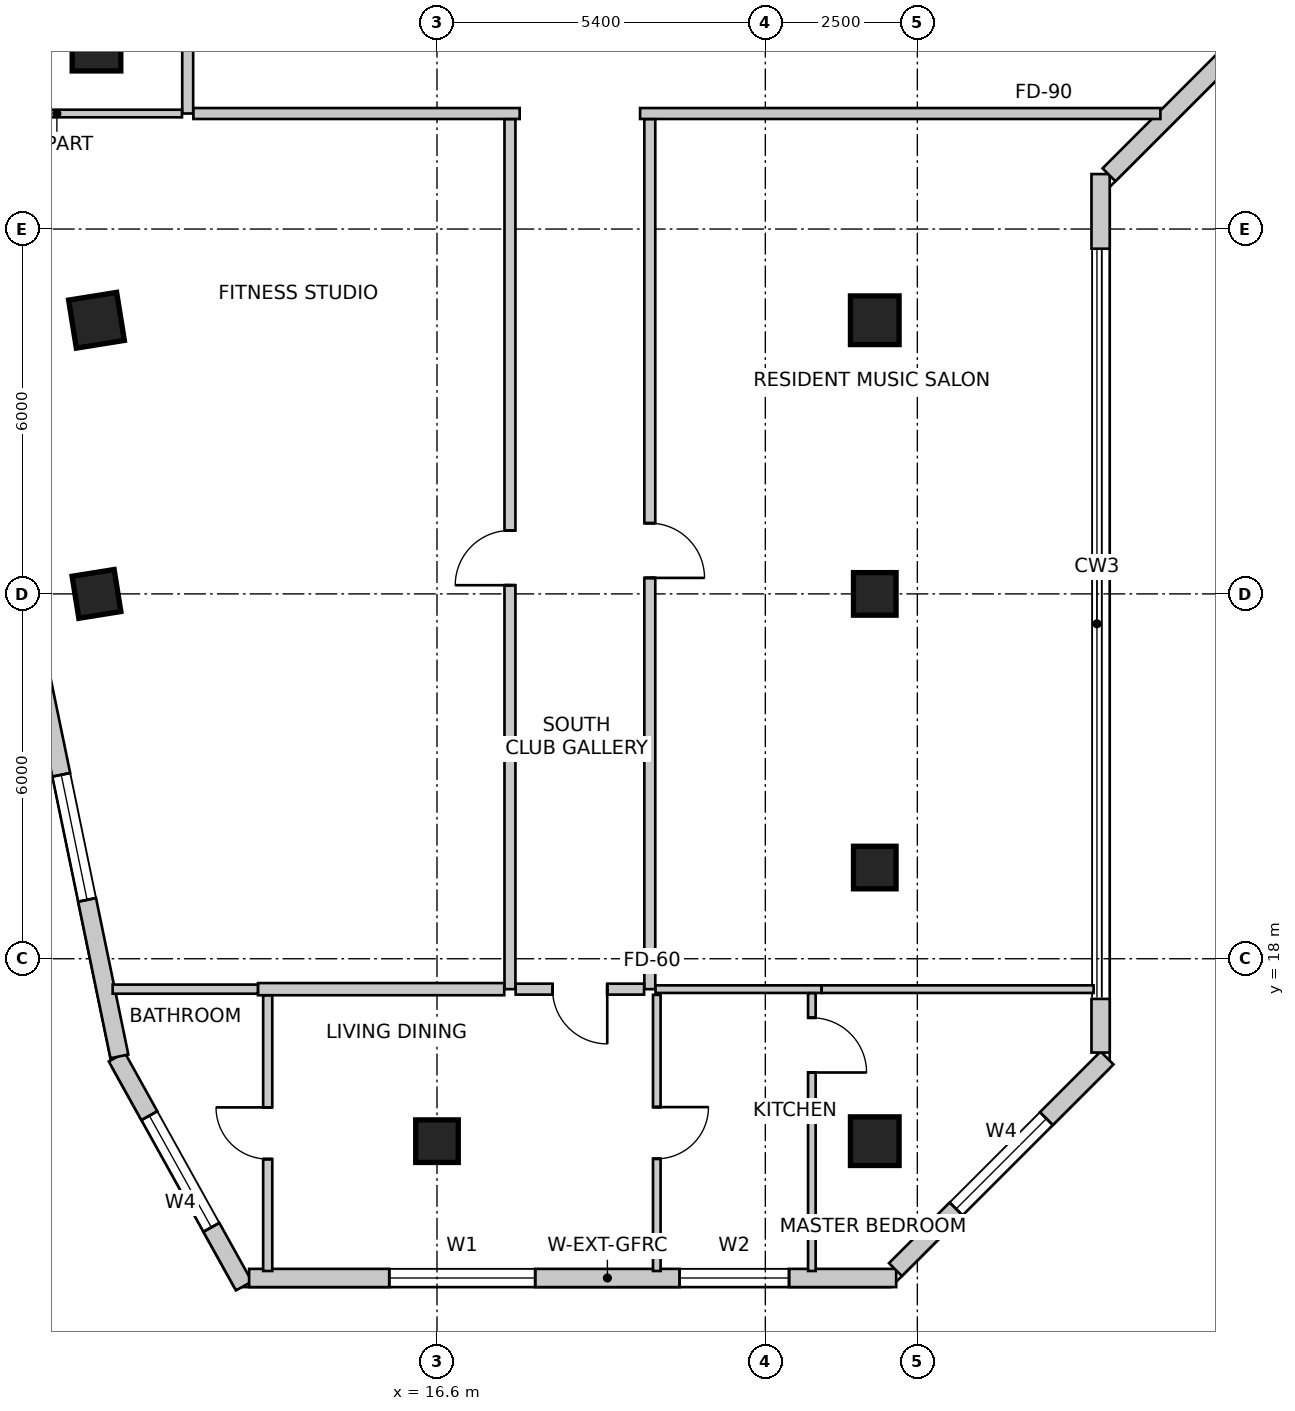
"""IFC4 building model, lengths in metres.
Left out: names, types, materials, properties, quantities, classifications, styles, units other than length and angle.
Written with IfcOpenShell. Run it as: python <this file> out.ifc"""

import sys

from ifc_helpers import new_model, si_unit, direction, frame, frame_2d, origin, origin_2d, place, context, subcontext, project, spatial, rectangle, extrude, source, transform, mapped, element, fill, save


model = new_model("IFC4")
c1 = context("Model", 3, precision=1e-05, world=origin(), true_north=direction((0.0, 1.0)))
c2 = subcontext(c1, "Body", "Model", "MODEL_VIEW")
j1 = project(units=[si_unit("LENGTHUNIT", "METRE"), si_unit("PLANEANGLEUNIT", "RADIAN")], contexts=[c1])
p1 = place(None, origin())
s1 = spatial("IfcSite", under=j1, at=p1, CompositionType="ELEMENT")
p2 = place(p1, origin())
s2 = spatial("IfcBuilding", under=s1, at=p2, CompositionType="ELEMENT")
p3 = place(p2, frame((0.0, 0.0, 228.9)))
s3 = spatial("IfcBuildingStorey", under=s2, at=p3, CompositionType="ELEMENT", Elevation=228.9)
m1 = source(origin(), c2, "Body", "SweptSolid", [
    extrude(rectangle(XDim=0.8, YDim=0.8, at=origin_2d()), origin(), (0.0, 0.0, 1.0), 3.5),
])
for number, where, z_axis, x_axis in (
    (1, (11.0, 33.0, 0.0), (0.0, 0.0, 1.0), (1.0, 0.0, 0.0)),
    (2, (11.0, 28.5, 0.0), (0.0, 0.0, 1.0), (0.158, -0.987, 0.0)),
):
    element("IfcColumn", number, at=place(p3, frame(where, z_axis=z_axis, x_axis=x_axis)), inside=s3, PredefinedType="COLUMN", context=c2, shape_type="MappedRepresentation", body=[
        mapped(m1, transform((0.0, 0.0, 0.0), scale=1.0)),
    ])
m2 = source(origin(), c2, "Body", "SweptSolid", [
    extrude(rectangle(XDim=0.7, YDim=0.7, at=origin_2d()), origin(), (0.0, 0.0, 1.0), 3.5),
])
p4 = place(p3, frame((11.0, 24.0, 0.0), z_axis=(0.0, 0.0, 1.0), x_axis=(0.158158067254, -0.987413806751, 0.0)))
e3 = element("IfcColumn", 3, at=p4, inside=s3, PredefinedType="COLUMN", context=c2, shape_type="MappedRepresentation", body=[
    mapped(m2, transform((0.0, 0.0, 0.0), scale=1.0)),
])
p5 = place(p3, frame((23.8, 28.5, 0.0), z_axis=(0.0, 0.0, 1.0), x_axis=(1.0, 0.0, 0.0)))
e4 = element("IfcColumn", 4, at=p5, inside=s3, PredefinedType="COLUMN", context=c2, shape_type="MappedRepresentation", body=[
    mapped(m1, transform((0.0, 0.0, 0.0), scale=1.0)),
])
for number, where, z_axis, x_axis in (
    (5, (23.8, 24.0, 0.0), (0.0, 0.0, 1.0), (1.0, 0.0, 0.0)),
    (6, (23.8, 19.5, 0.0), (0.0, 0.0, 1.0), (1.0, 0.0, 0.0)),
):
    element("IfcColumn", number, at=place(p3, frame(where, z_axis=z_axis, x_axis=x_axis)), inside=s3, PredefinedType="COLUMN", context=c2, shape_type="MappedRepresentation", body=[
        mapped(m2, transform((0.0, 0.0, 0.0), scale=1.0)),
    ])
p6 = place(p3, frame((23.8, 15.0, 0.0), z_axis=(0.0, 0.0, 1.0), x_axis=(1.0, 0.0, 0.0)))
e7 = element("IfcColumn", 7, at=p6, inside=s3, PredefinedType="COLUMN", context=c2, shape_type="MappedRepresentation", body=[
    mapped(m1, transform((0.0, 0.0, 0.0), scale=1.0)),
])
p7 = place(p3, frame((16.6, 15.0, 0.0), z_axis=(0.0, 0.0, 1.0), x_axis=(1.0, 0.0, 0.0)))
e8 = element("IfcColumn", 8, at=p7, inside=s3, PredefinedType="COLUMN", context=c2, shape_type="MappedRepresentation", body=[
    mapped(m2, transform((0.0, 0.0, 0.0), scale=1.0)),
])
p8 = place(p3, frame((11.333, 16.384, 0.0), z_axis=(0.0, 0.0, 1.0), x_axis=(0.485633305139, -0.874162623852, 0.0)))
e9 = element("IfcWall", 9, at=p8, inside=s3, PredefinedType="SOLIDWALL", context=c2, shape_type="SweptSolid", body=[
    extrude(rectangle(XDim=4.307, YDim=0.3, at=frame_2d((2.153, 0.0))), origin(), (0.0, 0.0, 1.0), 3.25),
])
m3 = source(origin(), c2, "Body", "SweptSolid", [
    extrude(rectangle(XDim=2.1, YDim=2.0, at=frame_2d((1.05, 1.0))), frame((0.0, 0.16, 0.0), z_axis=(0.0, -1.0, 0.0), x_axis=(1.0, 0.0, 0.0)), (0.0, 0.0, 1.0), 0.32),
])
p9 = place(p8, frame((1.104, 0.0, 0.85)))
e10 = element("IfcOpeningElement", 10, at=p9, cuts=e9, PredefinedType="OPENING", context=c2, shape_type="MappedRepresentation", body=[
    mapped(m3, transform((0.0, 0.0, 0.0), scale=1.0)),
])
p10 = place(p3, frame((13.51, 12.75, 0.0), z_axis=(0.0, 0.0, 1.0), x_axis=(1.0, 0.0, 0.0)))
e11 = element("IfcWall", 11, at=p10, inside=s3, PredefinedType="SOLIDWALL", context=c2, shape_type="SweptSolid", body=[
    extrude(rectangle(XDim=10.642, YDim=0.3, at=frame_2d((5.321, 0.0))), origin(), (0.0, 0.0, 1.0), 3.25),
])
m4 = source(origin(), c2, "Body", "SweptSolid", [
    extrude(rectangle(XDim=2.4, YDim=2.2, at=frame_2d((1.2, 1.1))), frame((0.0, 0.16, 0.0), z_axis=(0.0, -1.0, 0.0), x_axis=(1.0, 0.0, 0.0)), (0.0, 0.0, 1.0), 0.32),
])
p11 = place(p10, frame((2.305, 0.0, 0.85)))
e12 = element("IfcOpeningElement", 12, at=p11, cuts=e11, PredefinedType="OPENING", context=c2, shape_type="MappedRepresentation", body=[
    mapped(m4, transform((0.0, 0.0, 0.0), scale=1.0)),
])
m5 = source(origin(), c2, "Body", "SweptSolid", [
    extrude(rectangle(XDim=1.8, YDim=2.1, at=frame_2d((0.9, 1.05))), frame((0.0, 0.16, 0.0), z_axis=(0.0, -1.0, 0.0), x_axis=(1.0, 0.0, 0.0)), (0.0, 0.0, 1.0), 0.32),
])
p12 = place(p10, frame((7.08, 0.0, 0.85)))
e13 = element("IfcOpeningElement", 13, at=p12, cuts=e11, PredefinedType="OPENING", context=c2, shape_type="MappedRepresentation", body=[
    mapped(m5, transform((0.0, 0.0, 0.0), scale=1.0)),
])
p13 = place(p3, frame((24.14, 12.888, 0.0), z_axis=(0.0, 0.0, 1.0), x_axis=(0.707106781187, 0.707106781187, 0.0)))
e14 = element("IfcWall", 14, at=p13, inside=s3, PredefinedType="SOLIDWALL", context=c2, shape_type="SweptSolid", body=[
    extrude(rectangle(XDim=4.922, YDim=0.3, at=frame_2d((2.461, 0.0))), origin(), (0.0, 0.0, 1.0), 3.25),
])
p14 = place(p13, frame((1.411, 0.0, 0.85)))
e15 = element("IfcOpeningElement", 15, at=p14, cuts=e14, PredefinedType="OPENING", context=c2, shape_type="MappedRepresentation", body=[
    mapped(m3, transform((0.0, 0.0, 0.0), scale=1.0)),
])
p15 = place(p3, frame((27.514, 16.457, 0.0), z_axis=(0.0, 0.0, 1.0), x_axis=(0.0, 1.0, 0.0)))
e16 = element("IfcWall", 16, at=p15, inside=s3, PredefinedType="SOLIDWALL", context=c2, shape_type="SweptSolid", body=[
    extrude(rectangle(XDim=0.882, YDim=0.3, at=frame_2d((0.441, 0.0))), origin(), (0.0, 0.0, 1.0), 3.25),
])
p16 = place(p3, frame((27.514, 29.677, 0.0), z_axis=(0.0, 0.0, 1.0), x_axis=(0.0, 1.0, 0.0)))
e17 = element("IfcWall", 17, at=p16, inside=s3, PredefinedType="SOLIDWALL", context=c2, shape_type="SweptSolid", body=[
    extrude(rectangle(XDim=1.228, YDim=0.3, at=frame_2d((0.614, 0.0))), origin(), (0.0, 0.0, 1.0), 3.25),
])
p17 = place(p3, frame((27.652, 30.892, 0.0), z_axis=(0.0, 0.0, 1.0), x_axis=(0.707106781187, 0.707106781187, 0.0)))
e18 = element("IfcWall", 18, at=p17, inside=s3, PredefinedType="SOLIDWALL", context=c2, shape_type="SweptSolid", body=[
    extrude(rectangle(XDim=2.907, YDim=0.3, at=frame_2d((1.454, 0.0))), origin(), (0.0, 0.0, 1.0), 3.25),
])
p18 = place(p3, frame((13.269, 47.134, 0.0), z_axis=(0.0, 0.0, 1.0), x_axis=(-0.319920776449, -0.947444297464, 0.0)))
e19 = element("IfcWall", 19, at=p18, inside=s3, PredefinedType="SOLIDWALL", context=c2, shape_type="SweptSolid", body=[
    extrude(rectangle(XDim=16.133, YDim=0.3, at=frame_2d((8.067, 0.0))), origin(), (0.0, 0.0, 1.0), 3.25),
])
p19 = place(p18, frame((2.363, 0.0, 0.85)))
e20 = element("IfcOpeningElement", 20, at=p19, cuts=e19, PredefinedType="OPENING", context=c2, shape_type="MappedRepresentation", body=[
    mapped(m4, transform((0.0, 0.0, 0.0), scale=1.0)),
])
p20 = place(p18, frame((7.41, 0.0, 0.85)))
e21 = element("IfcOpeningElement", 21, at=p20, cuts=e19, PredefinedType="OPENING", context=c2, shape_type="MappedRepresentation", body=[
    mapped(m3, transform((0.0, 0.0, 0.0), scale=1.0)),
])
p21 = place(p18, frame((12.157, 0.0, 0.85)))
e22 = element("IfcOpeningElement", 22, at=p21, cuts=e19, PredefinedType="OPENING", context=c2, shape_type="MappedRepresentation", body=[
    mapped(m4, transform((0.0, 0.0, 0.0), scale=1.0)),
])
p22 = place(p3, frame((8.188, 31.834, 0.0), z_axis=(0.0, 0.0, 1.0), x_axis=(0.202303475707, -0.979322880217, 0.0)))
e23 = element("IfcWall", 23, at=p22, inside=s3, PredefinedType="SOLIDWALL", context=c2, shape_type="SweptSolid", body=[
    extrude(rectangle(XDim=15.766, YDim=0.3, at=frame_2d((7.883, 0.0))), origin(), (0.0, 0.0, 1.0), 3.25),
])
p23 = place(p22, frame((1.623, 0.0, 0.85)))
e24 = element("IfcOpeningElement", 24, at=p23, cuts=e23, PredefinedType="OPENING", context=c2, shape_type="MappedRepresentation", body=[
    mapped(m3, transform((0.0, 0.0, 0.0), scale=1.0)),
])
p24 = place(p22, frame((6.18, 0.0, 0.85)))
e25 = element("IfcOpeningElement", 25, at=p24, cuts=e23, PredefinedType="OPENING", context=c2, shape_type="MappedRepresentation", body=[
    mapped(m4, transform((0.0, 0.0, 0.0), scale=1.0)),
])
p25 = place(p22, frame((11.037, 0.0, 0.85)))
e26 = element("IfcOpeningElement", 26, at=p25, cuts=e23, PredefinedType="OPENING", context=c2, shape_type="MappedRepresentation", body=[
    mapped(m3, transform((0.0, 0.0, 0.0), scale=1.0)),
])
p26 = place(p3, frame((12.5, 31.9, 0.0), z_axis=(0.0, 0.0, 1.0), x_axis=(0.0, 1.0, 0.0)))
e27 = element("IfcWall", 27, at=p26, inside=s3, PredefinedType="PARTITIONING", context=c2, shape_type="SweptSolid", body=[
    extrude(rectangle(XDim=1.556, YDim=0.18, at=frame_2d((0.778, 0.0))), origin(), (0.0, 0.0, 1.0), 2.919),
])
p27 = place(p3, frame((17.96, 31.9, 0.0), z_axis=(0.0, 0.0, 1.0), x_axis=(-1.0, 0.0, 0.0)))
e28 = element("IfcWall", 28, at=p27, inside=s3, PredefinedType="PARTITIONING", context=c2, shape_type="SweptSolid", body=[
    extrude(rectangle(XDim=5.366, YDim=0.18, at=frame_2d((2.683, 0.0))), origin(), (0.0, 0.0, 1.0), 2.919),
])
p28 = place(p3, frame((28.497, 31.9, 0.0), z_axis=(0.0, 0.0, 1.0), x_axis=(-1.0, 0.0, 0.0)))
e29 = element("IfcWall", 29, at=p28, inside=s3, PredefinedType="PARTITIONING", context=c2, shape_type="SweptSolid", body=[
    extrude(rectangle(XDim=8.557, YDim=0.18, at=frame_2d((4.279, 0.0))), origin(), (0.0, 0.0, 1.0), 2.919),
])
p29 = place(p3, frame((12.406, 31.9, 0.0), z_axis=(0.0, 0.0, 1.0), x_axis=(-1.0, 0.0, 0.0)))
e30 = element("IfcWall", 30, at=p29, inside=s3, PredefinedType="PARTITIONING", context=c2, shape_type="SweptSolid", body=[
    extrude(rectangle(XDim=4.115, YDim=0.125, at=frame_2d((2.057, 0.0))), origin(), (0.0, 0.0, 1.0), 2.542),
])
p30 = place(p3, frame((17.8, 17.5, 0.0), z_axis=(0.0, 0.0, 1.0), x_axis=(0.0, 1.0, 0.0)))
e31 = element("IfcWall", 31, at=p30, inside=s3, PredefinedType="PARTITIONING", context=c2, shape_type="SweptSolid", body=[
    extrude(rectangle(XDim=14.306, YDim=0.18, at=frame_2d((7.153, 0.0))), origin(), (0.0, 0.0, 1.0), 2.766),
])
m6 = source(origin(), c2, "Body", "SweptSolid", [
    extrude(rectangle(XDim=0.9, YDim=2.15, at=frame_2d((0.45, 1.075))), frame((0.0, 0.1, 0.0), z_axis=(0.0, -1.0, 0.0), x_axis=(1.0, 0.0, 0.0)), (0.0, 0.0, 1.0), 0.2),
])
p31 = place(p30, frame((6.643, 0.0, 0.0)))
e32 = element("IfcOpeningElement", 32, at=p31, cuts=e31, PredefinedType="OPENING", context=c2, shape_type="MappedRepresentation", body=[
    mapped(m6, transform((0.0, 0.0, 0.0), scale=1.0)),
])
p32 = place(p3, frame((20.1, 31.806, 0.0), z_axis=(0.0, 0.0, 1.0), x_axis=(0.0, -1.0, 0.0)))
e33 = element("IfcWall", 33, at=p32, inside=s3, PredefinedType="PARTITIONING", context=c2, shape_type="SweptSolid", body=[
    extrude(rectangle(XDim=14.306, YDim=0.18, at=frame_2d((7.153, 0.0))), origin(), (0.0, 0.0, 1.0), 2.766),
])
p33 = place(p32, frame((6.643, 0.0, 0.0)))
e34 = element("IfcOpeningElement", 34, at=p33, cuts=e33, PredefinedType="OPENING", context=c2, shape_type="MappedRepresentation", body=[
    mapped(m6, transform((0.0, 0.0, 0.0), scale=1.0)),
])
p34 = place(p3, frame((20.006, 17.5, 0.0), z_axis=(0.0, 0.0, 1.0), x_axis=(-1.0, 0.0, 0.0)))
e35 = element("IfcWall", 35, at=p34, inside=s3, PredefinedType="PARTITIONING", context=c2, shape_type="SweptSolid", body=[
    extrude(rectangle(XDim=2.112, YDim=0.18, at=frame_2d((1.056, 0.0))), origin(), (0.0, 0.0, 1.0), 3.25),
])
p35 = place(p34, frame((0.606, 0.0, 0.0)))
e36 = element("IfcOpeningElement", 36, at=p35, cuts=e35, PredefinedType="OPENING", context=c2, shape_type="MappedRepresentation", body=[
    mapped(m6, transform((0.0, 0.0, 0.0), scale=1.0)),
])
p36 = place(p3, frame((17.706, 17.5, 0.0), z_axis=(0.0, 0.0, 1.0), x_axis=(-1.0, 0.0, 0.0)))
e37 = element("IfcWall", 37, at=p36, inside=s3, PredefinedType="PARTITIONING", context=c2, shape_type="SweptSolid", body=[
    extrude(rectangle(XDim=4.05, YDim=0.2, at=frame_2d((2.025, 0.0))), origin(), (0.0, 0.0, 1.0), 3.25),
])
p37 = place(p3, frame((13.654, 17.5, 0.0), z_axis=(0.0, 0.0, 1.0), x_axis=(-1.0, 0.0, 0.0)))
e38 = element("IfcWall", 38, at=p37, inside=s3, PredefinedType="PARTITIONING", context=c2, shape_type="SweptSolid", body=[
    extrude(rectangle(XDim=2.388, YDim=0.15, at=frame_2d((1.194, 0.0))), origin(), (0.0, 0.0, 1.0), 3.25),
])
p38 = place(p3, frame((22.925, 17.5, 0.0), z_axis=(0.0, 0.0, 1.0), x_axis=(-1.0, 0.0, 0.0)))
e39 = element("IfcWall", 39, at=p38, inside=s3, PredefinedType="PARTITIONING", context=c2, shape_type="SweptSolid", body=[
    extrude(rectangle(XDim=2.731, YDim=0.125, at=frame_2d((1.365, 0.0))), origin(), (0.0, 0.0, 1.0), 2.779),
])
p39 = place(p3, frame((27.399, 17.5, 0.0), z_axis=(0.0, 0.0, 1.0), x_axis=(-1.0, 0.0, 0.0)))
e40 = element("IfcWall", 40, at=p39, inside=s3, PredefinedType="PARTITIONING", context=c2, shape_type="SweptSolid", body=[
    extrude(rectangle(XDim=4.472, YDim=0.125, at=frame_2d((2.236, 0.0))), origin(), (0.0, 0.0, 1.0), 2.542),
])
p40 = place(p3, frame((13.816, 12.865, 0.0), z_axis=(0.0, 0.0, 1.0), x_axis=(0.0, 1.0, 0.0)))
e41 = element("IfcWall", 41, at=p40, inside=s3, PredefinedType="PARTITIONING", context=c2, shape_type="SweptSolid", body=[
    extrude(rectangle(XDim=4.531, YDim=0.15, at=frame_2d((2.266, 0.0))), origin(), (0.0, 0.0, 1.0), 3.25),
])
m7 = source(origin(), c2, "Body", "SweptSolid", [
    extrude(rectangle(XDim=0.85, YDim=2.15, at=frame_2d((0.425, 1.075))), frame((0.0, 0.085, 0.0), z_axis=(0.0, -1.0, 0.0), x_axis=(1.0, 0.0, 0.0)), (0.0, 0.0, 1.0), 0.17),
])
p41 = place(p40, frame((1.841, 0.0, 0.0)))
e42 = element("IfcOpeningElement", 42, at=p41, cuts=e41, PredefinedType="OPENING", context=c2, shape_type="MappedRepresentation", body=[
    mapped(m7, transform((0.0, 0.0, 0.0), scale=1.0)),
])
p42 = place(p3, frame((20.215, 17.406, 0.0), z_axis=(0.0, 0.0, 1.0), x_axis=(0.0, -1.0, 0.0)))
e43 = element("IfcWall", 43, at=p42, inside=s3, PredefinedType="PARTITIONING", context=c2, shape_type="SweptSolid", body=[
    extrude(rectangle(XDim=4.541, YDim=0.125, at=frame_2d((2.271, 0.0))), origin(), (0.0, 0.0, 1.0), 2.542),
])
m8 = source(origin(), c2, "Body", "SweptSolid", [
    extrude(rectangle(XDim=0.85, YDim=2.15, at=frame_2d((0.425, 1.075))), frame((0.0, 0.073, 0.0), z_axis=(0.0, -1.0, 0.0), x_axis=(1.0, 0.0, 0.0)), (0.0, 0.0, 1.0), 0.145),
])
p43 = place(p42, frame((1.845, 0.0, 0.0)))
e44 = element("IfcOpeningElement", 44, at=p43, cuts=e43, PredefinedType="OPENING", context=c2, shape_type="MappedRepresentation", body=[
    mapped(m8, transform((0.0, 0.0, 0.0), scale=1.0)),
])
p44 = place(p3, frame((22.765, 17.434, 0.0), z_axis=(0.0, 0.0, 1.0), x_axis=(0.0, -1.0, 0.0)))
e45 = element("IfcWall", 45, at=p44, inside=s3, PredefinedType="PARTITIONING", context=c2, shape_type="SweptSolid", body=[
    extrude(rectangle(XDim=4.569, YDim=0.125, at=frame_2d((2.284, 0.0))), origin(), (0.0, 0.0, 1.0), 2.542),
])
m9 = source(origin(), c2, "Body", "SweptSolid", [
    extrude(rectangle(XDim=0.9, YDim=2.15, at=frame_2d((0.45, 1.075))), frame((0.0, 0.073, 0.0), z_axis=(0.0, -1.0, 0.0), x_axis=(1.0, 0.0, 0.0)), (0.0, 0.0, 1.0), 0.145),
])
p45 = place(p44, frame((0.404, 0.0, 0.0)))
e46 = element("IfcOpeningElement", 46, at=p45, cuts=e45, PredefinedType="OPENING", context=c2, shape_type="MappedRepresentation", body=[
    mapped(m9, transform((0.0, 0.0, 0.0), scale=1.0)),
])
m10 = source(origin(), c2, "Body", "SweptSolid", [
    extrude(rectangle(XDim=2.1, YDim=2.0, at=frame_2d((1.05, 1.0))), frame((0.0, -0.015, 0.0), z_axis=(0.0, -1.0, 0.0), x_axis=(1.0, 0.0, 0.0)), (0.0, 0.0, 1.0), 0.06),
])
p46 = place(p9, origin())
e47 = element("IfcWindow", 47, at=p46, inside=s3, PartitioningType="SINGLE_PANEL", PredefinedType="WINDOW", context=c2, shape_type="MappedRepresentation", body=[
    mapped(m10, transform((0.0, 0.0, 0.0), scale=1.0)),
])
fill(e10, e47)
m11 = source(origin(), c2, "Body", "SweptSolid", [
    extrude(rectangle(XDim=2.4, YDim=2.2, at=frame_2d((1.2, 1.1))), frame((0.0, -0.015, 0.0), z_axis=(0.0, -1.0, 0.0), x_axis=(1.0, 0.0, 0.0)), (0.0, 0.0, 1.0), 0.06),
])
p47 = place(p11, origin())
e48 = element("IfcWindow", 48, at=p47, inside=s3, PartitioningType="SINGLE_PANEL", PredefinedType="WINDOW", context=c2, shape_type="MappedRepresentation", body=[
    mapped(m11, transform((0.0, 0.0, 0.0), scale=1.0)),
])
fill(e12, e48)
m12 = source(origin(), c2, "Body", "SweptSolid", [
    extrude(rectangle(XDim=1.8, YDim=2.1, at=frame_2d((0.9, 1.05))), frame((0.0, -0.015, 0.0), z_axis=(0.0, -1.0, 0.0), x_axis=(1.0, 0.0, 0.0)), (0.0, 0.0, 1.0), 0.06),
])
p48 = place(p12, origin())
e49 = element("IfcWindow", 49, at=p48, inside=s3, PartitioningType="SINGLE_PANEL", PredefinedType="WINDOW", context=c2, shape_type="MappedRepresentation", body=[
    mapped(m12, transform((0.0, 0.0, 0.0), scale=1.0)),
])
fill(e13, e49)
p49 = place(p14, origin())
e50 = element("IfcWindow", 50, at=p49, inside=s3, PartitioningType="SINGLE_PANEL", PredefinedType="WINDOW", context=c2, shape_type="MappedRepresentation", body=[
    mapped(m10, transform((0.0, 0.0, 0.0), scale=1.0)),
])
fill(e15, e50)
p50 = place(p25, origin())
e51 = element("IfcWindow", 51, at=p50, inside=s3, PartitioningType="SINGLE_PANEL", PredefinedType="WINDOW", context=c2, shape_type="MappedRepresentation", body=[
    mapped(m10, transform((0.0, 0.0, 0.0), scale=1.0)),
])
fill(e26, e51)
m13 = source(origin(), c2, "Body", "SweptSolid", [
    extrude(rectangle(XDim=0.9, YDim=2.15, at=frame_2d((0.45, 1.075))), frame((0.0, 0.025, 0.0), z_axis=(0.0, -1.0, 0.0), x_axis=(1.0, 0.0, 0.0)), (0.0, 0.0, 1.0), 0.05),
])
p51 = place(p31, origin())
e52 = element("IfcDoor", 52, at=p51, inside=s3, OperationType="SINGLE_SWING_LEFT", PredefinedType="DOOR", context=c2, shape_type="MappedRepresentation", body=[
    mapped(m13, transform((0.0, 0.0, 0.0), scale=1.0)),
])
fill(e32, e52)
p52 = place(p33, origin())
e53 = element("IfcDoor", 53, at=p52, inside=s3, OperationType="SINGLE_SWING_RIGHT", PredefinedType="DOOR", context=c2, shape_type="MappedRepresentation", body=[
    mapped(m13, transform((0.0, 0.0, 0.0), scale=1.0)),
])
fill(e34, e53)
m14 = source(origin(), c2, "Body", "SweptSolid", [
    extrude(rectangle(XDim=0.9, YDim=2.15, at=frame_2d((0.45, 1.075))), frame((0.0, 0.025, 0.0), z_axis=(0.0, -1.0, 0.0), x_axis=(1.0, 0.0, 0.0)), (0.0, 0.0, 1.0), 0.05),
])
p53 = place(p35, origin())
e54 = element("IfcDoor", 54, at=p53, inside=s3, OperationType="SINGLE_SWING_LEFT", PredefinedType="DOOR", context=c2, shape_type="MappedRepresentation", body=[
    mapped(m14, transform((0.0, 0.0, 0.0), scale=1.0)),
])
fill(e36, e54)
m15 = source(origin(), c2, "Body", "SweptSolid", [
    extrude(rectangle(XDim=0.85, YDim=2.15, at=frame_2d((0.425, 1.075))), frame((0.0, 0.025, 0.0), z_axis=(0.0, -1.0, 0.0), x_axis=(1.0, 0.0, 0.0)), (0.0, 0.0, 1.0), 0.05),
])
p54 = place(p41, origin())
e55 = element("IfcDoor", 55, at=p54, inside=s3, OperationType="SINGLE_SWING_RIGHT", PredefinedType="DOOR", context=c2, shape_type="MappedRepresentation", body=[
    mapped(m15, transform((0.0, 0.0, 0.0), scale=1.0)),
])
fill(e42, e55)
p55 = place(p43, origin())
e56 = element("IfcDoor", 56, at=p55, inside=s3, OperationType="SINGLE_SWING_LEFT", PredefinedType="DOOR", context=c2, shape_type="MappedRepresentation", body=[
    mapped(m15, transform((0.0, 0.0, 0.0), scale=1.0)),
])
fill(e44, e56)
p56 = place(p45, origin())
e57 = element("IfcDoor", 57, at=p56, inside=s3, OperationType="SINGLE_SWING_RIGHT", PredefinedType="DOOR", context=c2, shape_type="MappedRepresentation", body=[
    mapped(m13, transform((0.0, 0.0, 0.0), scale=1.0)),
])
fill(e46, e57)
save(model, sys.argv[1])
